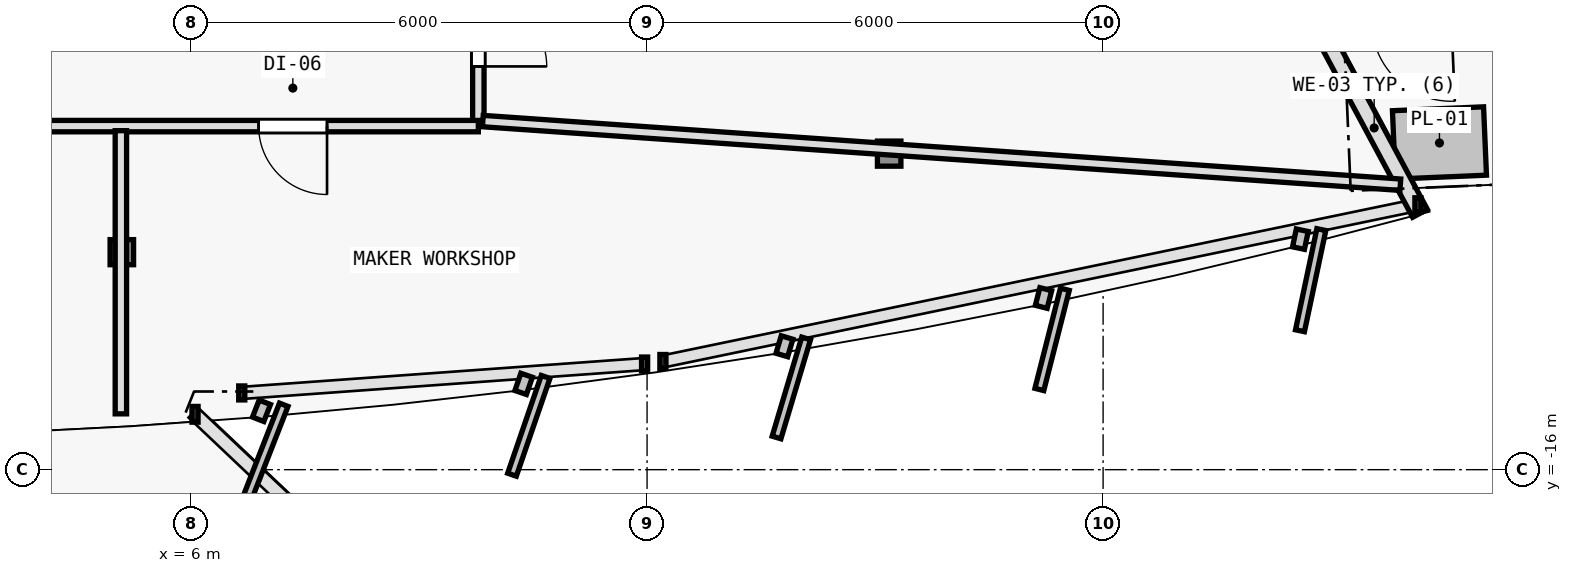
"""IFC4 building model, lengths in metres.
Left out: names, types, materials, properties, quantities, classifications, styles, units other than length and angle.
Written with IfcOpenShell. Run it as: python <this file> out.ifc"""

import sys

from ifc_helpers import new_model, si_unit, direction, frame, frame_2d, origin, origin_2d, place, context, subcontext, project, spatial, rectangle, i_section, extrude, element, fill, save


model = new_model("IFC4")
c1 = context("Model", 3, precision=1e-05, world=origin(), true_north=direction((0.0, 1.0)))
c2 = subcontext(c1, "Body", "Model", "MODEL_VIEW")
j1 = project(units=[si_unit("LENGTHUNIT", "METRE"), si_unit("PLANEANGLEUNIT", "RADIAN")], contexts=[c1])
p1 = place(None, origin())
s1 = spatial("IfcSite", under=j1, at=p1, CompositionType="ELEMENT")
p2 = place(p1, origin())
s2 = spatial("IfcBuilding", under=s1, at=p2, CompositionType="ELEMENT")
p3 = place(p2, frame((0.0, 0.0, 286.8)))
s3 = spatial("IfcBuildingStorey", under=s2, at=p3, CompositionType="ELEMENT", Elevation=286.8)
p4 = place(p3, frame((5.089, -13.138, 0.005), z_axis=(-0.006865841702, 0.035280909339, 0.999353850072), x_axis=(-0.981585848295, -0.191021523464, 0.0)))
e1 = element("IfcColumn", 1, at=p4, inside=s3, PredefinedType="COLUMN", context=c2, shape_type="SweptSolid", body=[
    extrude(i_section(OverallWidth=0.309, OverallDepth=0.33, WebThickness=0.011, FlangeThickness=0.019, FilletRadius=0.027, at=origin_2d()), origin(), (0.0, 0.0, 1.0), 3.592),
])
p5 = place(p3, frame((15.185, -11.842, 0.005), z_axis=(-0.020662834962, 0.033509136961, 0.999224792022), x_axis=(-0.851183725565, -0.524867855115, 0.0)))
e2 = element("IfcColumn", 2, at=p5, inside=s3, PredefinedType="COLUMN", context=c2, shape_type="SweptSolid", body=[
    extrude(i_section(OverallWidth=0.309, OverallDepth=0.33, WebThickness=0.011, FlangeThickness=0.019, FilletRadius=0.027, at=origin_2d()), origin(), (0.0, 0.0, 1.0), 3.592),
])
p6 = place(p3, frame((20.964, -10.381, 0.0), z_axis=(0.0, 0.0, 1.0), x_axis=(0.472728849632, -0.881207940685, 0.0)))
e3 = element("IfcWall", 3, at=p6, inside=s3, PredefinedType="SOLIDWALL", context=c2, shape_type="SweptSolid", body=[
    extrude(rectangle(XDim=2.55, YDim=0.22, at=frame_2d((1.275, 0.0))), origin(), (0.0, 0.0, 1.0), 3.35),
])
p7 = place(p3, frame((9.78, 8.226, 0.0), z_axis=(0.0, 0.0, 1.0), x_axis=(0.0, -1.0, 0.0)))
e4 = element("IfcWall", 4, at=p7, inside=s3, PredefinedType="PARTITIONING", context=c2, shape_type="SweptSolid", body=[
    extrude(rectangle(XDim=19.706, YDim=0.15, at=frame_2d((9.853, 0.0))), origin(), (0.0, 0.0, 1.0), 2.825),
])
p8 = place(p7, frame((18.021, 0.0, 0.0)))
e5 = element("IfcOpeningElement", 5, at=p8, cuts=e4, PredefinedType="OPENING", context=c2, shape_type="SweptSolid", body=[
    extrude(rectangle(XDim=0.9, YDim=2.1, at=frame_2d((0.45, 1.05))), frame((0.0, 0.085, 0.0), z_axis=(0.0, -1.0, 0.0), x_axis=(1.0, 0.0, 0.0)), (0.0, 0.0, 1.0), 0.17),
])
p9 = place(p7, frame((16.256, 0.0, 0.0)))
e6 = element("IfcOpeningElement", 6, at=p9, cuts=e4, PredefinedType="OPENING", context=c2, shape_type="SweptSolid", body=[
    extrude(rectangle(XDim=0.85, YDim=2.1, at=frame_2d((0.425, 1.05))), frame((0.0, 0.085, 0.0), z_axis=(0.0, -1.0, 0.0), x_axis=(1.0, 0.0, 0.0)), (0.0, 0.0, 1.0), 0.17),
])
p10 = place(p7, frame((14.731, 0.0, 0.0)))
e7 = element("IfcOpeningElement", 7, at=p10, cuts=e4, PredefinedType="OPENING", context=c2, shape_type="SweptSolid", body=[
    extrude(rectangle(XDim=0.85, YDim=2.1, at=frame_2d((0.425, 1.05))), frame((0.0, 0.085, 0.0), z_axis=(0.0, -1.0, 0.0), x_axis=(1.0, 0.0, 0.0)), (0.0, 0.0, 1.0), 0.17),
])
p11 = place(p7, frame((13.023, 0.0, 0.0)))
e8 = element("IfcOpeningElement", 8, at=p11, cuts=e4, PredefinedType="OPENING", context=c2, shape_type="SweptSolid", body=[
    extrude(rectangle(XDim=0.85, YDim=2.1, at=frame_2d((0.425, 1.05))), frame((0.0, 0.085, 0.0), z_axis=(0.0, -1.0, 0.0), x_axis=(1.0, 0.0, 0.0)), (0.0, 0.0, 1.0), 0.17),
])
p12 = place(p7, frame((11.31, 0.0, 0.0)))
e9 = element("IfcOpeningElement", 9, at=p12, cuts=e4, PredefinedType="OPENING", context=c2, shape_type="SweptSolid", body=[
    extrude(rectangle(XDim=0.85, YDim=2.1, at=frame_2d((0.425, 1.05))), frame((0.0, 0.085, 0.0), z_axis=(0.0, -1.0, 0.0), x_axis=(1.0, 0.0, 0.0)), (0.0, 0.0, 1.0), 0.17),
])
p13 = place(p7, frame((9.076, 0.0, 0.0)))
e10 = element("IfcOpeningElement", 10, at=p13, cuts=e4, PredefinedType="OPENING", context=c2, shape_type="SweptSolid", body=[
    extrude(rectangle(XDim=0.9, YDim=2.1, at=frame_2d((0.45, 1.05))), frame((0.0, 0.085, 0.0), z_axis=(0.0, -1.0, 0.0), x_axis=(1.0, 0.0, 0.0)), (0.0, 0.0, 1.0), 0.17),
])
p14 = place(p7, frame((6.611, 0.0, 0.0)))
e11 = element("IfcOpeningElement", 11, at=p14, cuts=e4, PredefinedType="OPENING", context=c2, shape_type="SweptSolid", body=[
    extrude(rectangle(XDim=0.9, YDim=2.1, at=frame_2d((0.45, 1.05))), frame((0.0, 0.085, 0.0), z_axis=(0.0, -1.0, 0.0), x_axis=(1.0, 0.0, 0.0)), (0.0, 0.0, 1.0), 0.17),
])
p15 = place(p7, frame((4.329, 0.0, 0.0)))
e12 = element("IfcOpeningElement", 12, at=p15, cuts=e4, PredefinedType="OPENING", context=c2, shape_type="SweptSolid", body=[
    extrude(rectangle(XDim=0.9, YDim=2.1, at=frame_2d((0.45, 1.05))), frame((0.0, 0.085, 0.0), z_axis=(0.0, -1.0, 0.0), x_axis=(1.0, 0.0, 0.0)), (0.0, 0.0, 1.0), 0.17),
])
p16 = place(p3, frame((9.78, -11.48, 0.0), z_axis=(0.0, 0.0, 1.0), x_axis=(-1.0, 0.0, 0.0)))
e13 = element("IfcWall", 13, at=p16, inside=s3, PredefinedType="PARTITIONING", context=c2, shape_type="SweptSolid", body=[
    extrude(rectangle(XDim=19.56, YDim=0.15, at=frame_2d((9.78, 0.0))), origin(), (0.0, 0.0, 1.0), 2.965),
])
p17 = place(p16, frame((11.592, 0.0, 0.0)))
e14 = element("IfcOpeningElement", 14, at=p17, cuts=e13, PredefinedType="OPENING", context=c2, shape_type="SweptSolid", body=[
    extrude(rectangle(XDim=0.9, YDim=2.1, at=frame_2d((0.45, 1.05))), frame((0.0, 0.085, 0.0), z_axis=(0.0, -1.0, 0.0), x_axis=(1.0, 0.0, 0.0)), (0.0, 0.0, 1.0), 0.17),
])
p18 = place(p16, frame((1.991, 0.0, 0.0)))
e15 = element("IfcOpeningElement", 15, at=p18, cuts=e13, PredefinedType="OPENING", context=c2, shape_type="SweptSolid", body=[
    extrude(rectangle(XDim=0.9, YDim=2.1, at=frame_2d((0.45, 1.05))), frame((0.0, 0.085, 0.0), z_axis=(0.0, -1.0, 0.0), x_axis=(1.0, 0.0, 0.0)), (0.0, 0.0, 1.0), 0.17),
])
p19 = place(p3, frame((5.077, -11.54, 0.0), z_axis=(0.0, 0.0, 1.0), x_axis=(0.0, -1.0, 0.0)))
e16 = element("IfcWall", 16, at=p19, inside=s3, PredefinedType="PARTITIONING", context=c2, shape_type="SweptSolid", body=[
    extrude(rectangle(XDim=3.725, YDim=0.15, at=frame_2d((1.863, 0.0))), origin(), (0.0, 0.0, 1.0), 2.775),
])
p20 = place(p3, frame((9.839, -11.414, 0.0), z_axis=(0.0, 0.0, 1.0), x_axis=(0.997602550349, -0.069203695979, 0.0)))
e17 = element("IfcWall", 17, at=p20, inside=s3, PredefinedType="PARTITIONING", context=c2, shape_type="SweptSolid", body=[
    extrude(rectangle(XDim=12.101, YDim=0.15, at=frame_2d((6.05, 0.0))), origin(), (0.0, 0.0, 1.0), 2.775),
])
p21 = place(p18, origin())
e18 = element("IfcDoor", 18, at=p21, inside=s3, OperationType="SINGLE_SWING_LEFT", PredefinedType="DOOR", context=c2, shape_type="SweptSolid", body=[
    extrude(rectangle(XDim=0.9, YDim=2.1, at=frame_2d((0.45, 1.05))), frame((0.0, 0.025, 0.0), z_axis=(0.0, -1.0, 0.0), x_axis=(1.0, 0.0, 0.0)), (0.0, 0.0, 1.0), 0.05),
])
fill(e15, e18)
p22 = place(p8, origin())
e19 = element("IfcDoor", 19, at=p22, inside=s3, OperationType="SINGLE_SWING_RIGHT", PredefinedType="DOOR", context=c2, shape_type="SweptSolid", body=[
    extrude(rectangle(XDim=0.9, YDim=2.1, at=frame_2d((0.45, 1.05))), frame((0.0, 0.025, 0.0), z_axis=(0.0, -1.0, 0.0), x_axis=(1.0, 0.0, 0.0)), (0.0, 0.0, 1.0), 0.05),
])
fill(e5, e19)
save(model, sys.argv[1])
